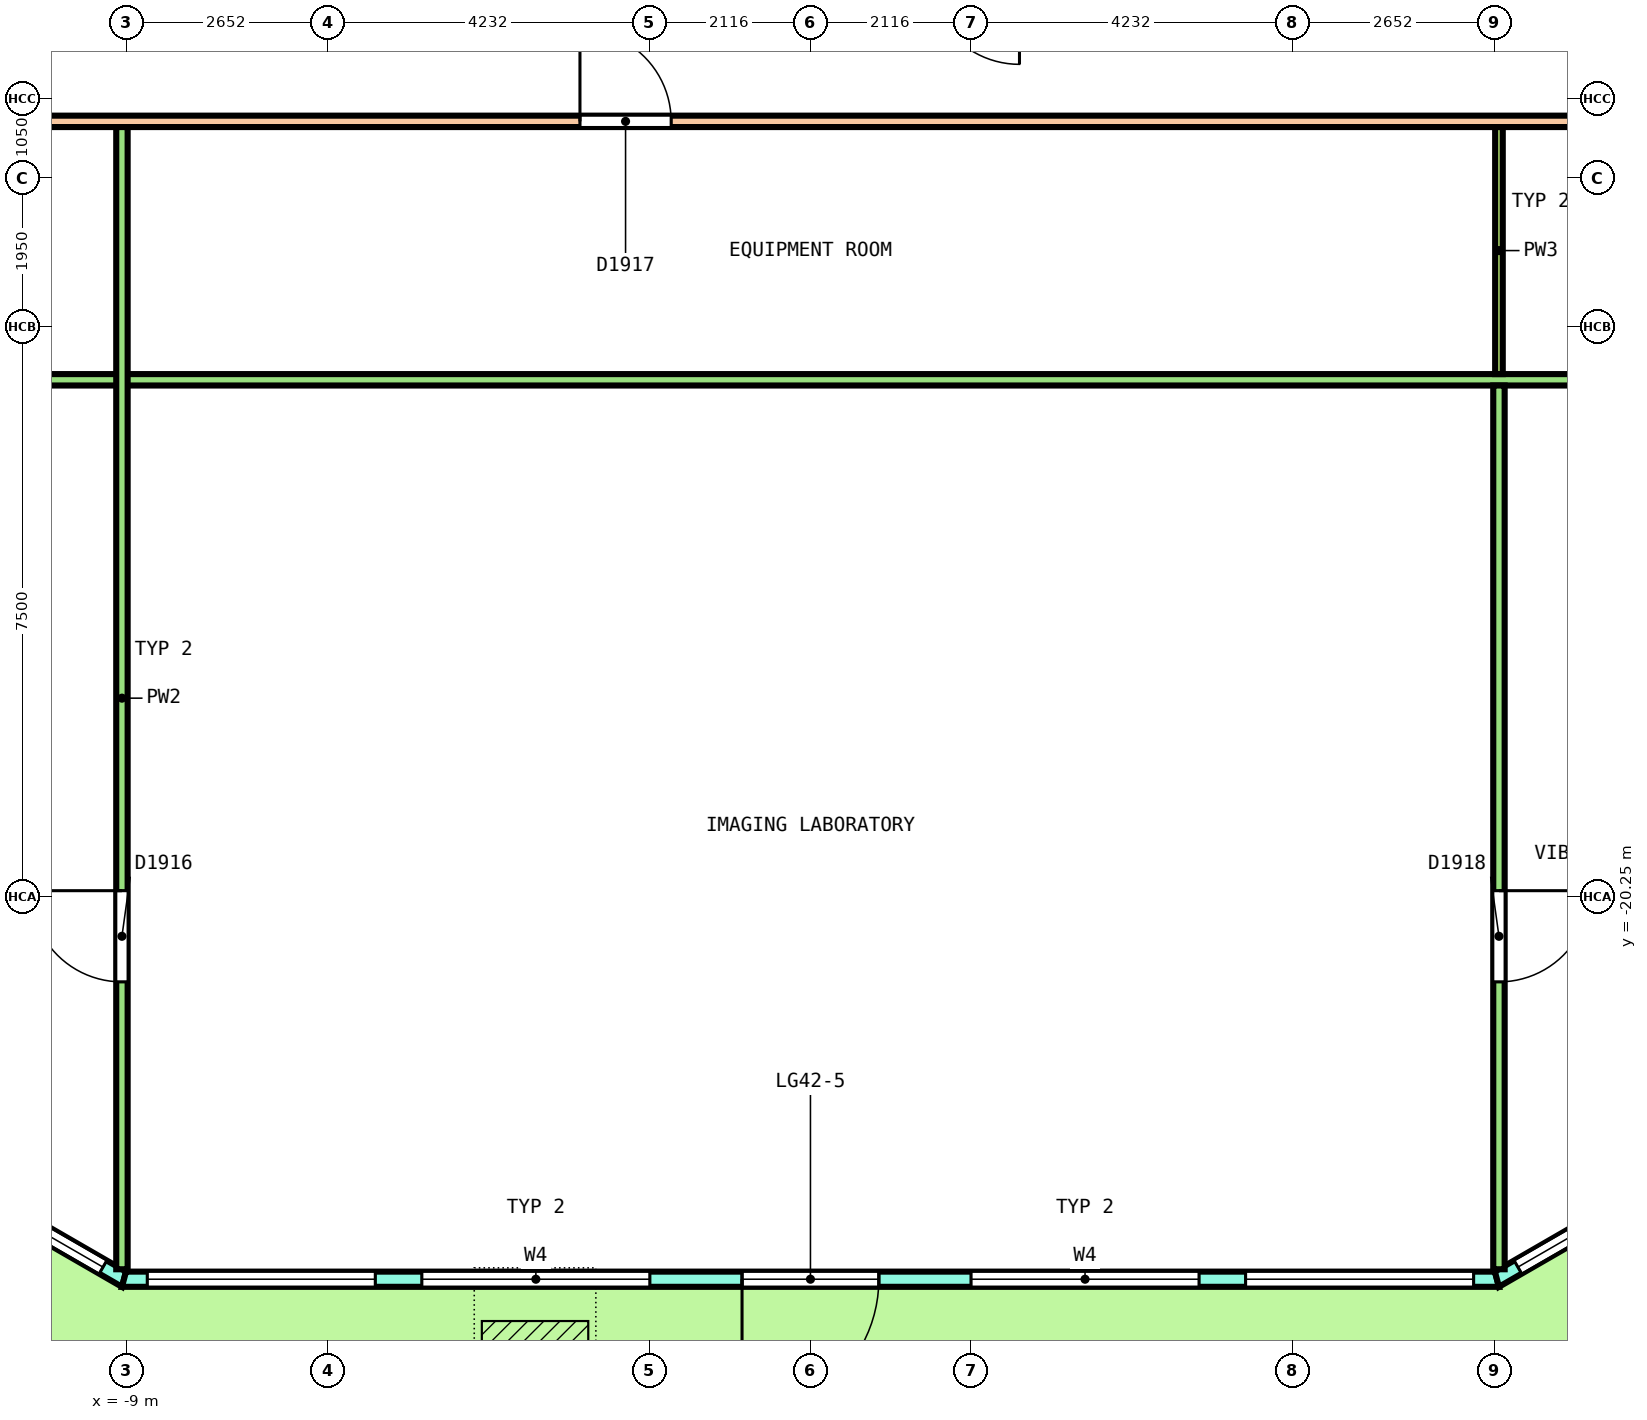
"""IFC4 building model, lengths in metres.
Left out: names, types, materials, properties, quantities, classifications, styles, units other than length and angle.
Written with IfcOpenShell. Run it as: python <this file> out.ifc"""

import sys

from ifc_helpers import new_model, si_unit, direction, frame, frame_2d, origin, place, context, subcontext, project, spatial, polyline, rectangle, outline, extrude, element, fill, save


model = new_model("IFC4")
c1 = context("Model", 3, precision=1e-05, world=origin(), true_north=direction((0.0, 1.0)))
c2 = subcontext(c1, "Body", "Model", "MODEL_VIEW")
j1 = project(units=[si_unit("LENGTHUNIT", "METRE"), si_unit("PLANEANGLEUNIT", "RADIAN")], contexts=[c1])
p1 = place(None, origin())
s1 = spatial("IfcSite", under=j1, at=p1, CompositionType="ELEMENT")
p2 = place(p1, origin())
s2 = spatial("IfcBuilding", under=s1, at=p2, CompositionType="ELEMENT")
p3 = place(p2, frame((0.0, 0.0, 193.6)))
s3 = spatial("IfcBuildingStorey", under=s2, at=p3, CompositionType="ELEMENT", Elevation=193.6)
p4 = place(p3, frame((-14.985, -21.845, 0.0), z_axis=(0.0, 0.0, 1.0), x_axis=(0.866029458321, -0.49999297727, 0.0)))
e1 = element("IfcWall", 1, at=p4, inside=s3, PredefinedType="SOLIDWALL", context=c2, shape_type="SweptSolid", body=[
    extrude(outline(polyline([(-0.027, -0.1), (1.128, -0.1), (2.282, -0.1), (3.437, -0.1), (4.592, -0.1), (5.747, -0.1), (6.901, -0.1), (6.848, 0.1), (5.711, 0.1), (4.574, 0.1), (3.437, 0.1), (2.301, 0.1), (1.164, 0.1), (0.027, 0.1), (-0.027, -0.1)])), origin(), (0.0, 0.0, 1.0), 4.1),
])
p5 = place(p4, frame((0.319, 0.0, 0.1)))
e2 = element("IfcOpeningElement", 2, at=p5, cuts=e1, PredefinedType="OPENING", context=c2, shape_type="SweptSolid", body=[
    extrude(rectangle(XDim=2.8, YDim=2.9, at=frame_2d((1.4, 1.45))), frame((0.0, 0.11, 0.0), z_axis=(0.0, -1.0, 0.0), x_axis=(1.0, 0.0, 0.0)), (0.0, 0.0, 1.0), 0.22),
])
p6 = place(p4, frame((3.756, 0.0, 0.1)))
e3 = element("IfcOpeningElement", 3, at=p6, cuts=e1, PredefinedType="OPENING", context=c2, shape_type="SweptSolid", body=[
    extrude(rectangle(XDim=2.8, YDim=2.9, at=frame_2d((1.4, 1.45))), frame((0.0, 0.11, 0.0), z_axis=(0.0, -1.0, 0.0), x_axis=(1.0, 0.0, 0.0)), (0.0, 0.0, 1.0), 0.22),
])
p7 = place(p3, frame((-9.031, -25.283, 0.0), z_axis=(0.0, 0.0, 1.0), x_axis=(1.0, 0.0, 0.0)))
e4 = element("IfcWall", 4, at=p7, inside=s3, PredefinedType="SOLIDWALL", context=c2, shape_type="SweptSolid", body=[
    extrude(outline(polyline([(-0.027, -0.1), (0.979, -0.1), (1.986, -0.1), (2.992, -0.1), (3.999, -0.1), (5.005, -0.1), (6.012, -0.1), (7.018, -0.1), (8.025, -0.1), (9.031, -0.1), (10.038, -0.1), (11.044, -0.1), (12.051, -0.1), (13.057, -0.1), (14.063, -0.1), (15.07, -0.1), (16.076, -0.1), (17.083, -0.1), (18.089, -0.1), (18.036, 0.1), (17.035, 0.1), (16.035, 0.1), (15.034, 0.1), (14.034, 0.1), (13.033, 0.1), (12.033, 0.1), (11.032, 0.1), (10.032, 0.1), (9.031, 0.1), (8.031, 0.1), (7.03, 0.1), (6.03, 0.1), (5.029, 0.1), (4.029, 0.1), (3.028, 0.1), (2.028, 0.1), (1.027, 0.1), (0.027, 0.1), (-0.027, -0.1)])), origin(), (0.0, 0.0, 1.0), 4.1),
])
p8 = place(p7, frame((0.306, 0.0, 0.1)))
e5 = element("IfcOpeningElement", 5, at=p8, cuts=e4, PredefinedType="OPENING", context=c2, shape_type="SweptSolid", body=[
    extrude(rectangle(XDim=3.0, YDim=2.9, at=frame_2d((1.5, 1.45))), frame((0.0, 0.11, 0.0), z_axis=(0.0, -1.0, 0.0), x_axis=(1.0, 0.0, 0.0)), (0.0, 0.0, 1.0), 0.22),
])
p9 = place(p7, frame((3.919, 0.0, 0.1)))
e6 = element("IfcOpeningElement", 6, at=p9, cuts=e4, PredefinedType="OPENING", context=c2, shape_type="SweptSolid", body=[
    extrude(rectangle(XDim=3.0, YDim=2.9, at=frame_2d((1.5, 1.45))), frame((0.0, 0.11, 0.0), z_axis=(0.0, -1.0, 0.0), x_axis=(1.0, 0.0, 0.0)), (0.0, 0.0, 1.0), 0.22),
])
p10 = place(p7, frame((8.131, 0.0, 0.0)))
e7 = element("IfcOpeningElement", 7, at=p10, cuts=e4, PredefinedType="OPENING", context=c2, shape_type="SweptSolid", body=[
    extrude(rectangle(XDim=1.8, YDim=2.4, at=frame_2d((0.9, 1.2))), frame((0.0, 0.11, 0.0), z_axis=(0.0, -1.0, 0.0), x_axis=(1.0, 0.0, 0.0)), (0.0, 0.0, 1.0), 0.22),
])
p11 = place(p7, frame((8.131, 0.0, 2.55)))
e8 = element("IfcOpeningElement", 8, at=p11, cuts=e4, PredefinedType="OPENING", context=c2, shape_type="SweptSolid", body=[
    extrude(rectangle(XDim=1.8, YDim=0.45, at=frame_2d((0.9, 0.225))), frame((0.0, 0.11, 0.0), z_axis=(0.0, -1.0, 0.0), x_axis=(1.0, 0.0, 0.0)), (0.0, 0.0, 1.0), 0.22),
])
p12 = place(p7, frame((11.144, 0.0, 0.1)))
e9 = element("IfcOpeningElement", 9, at=p12, cuts=e4, PredefinedType="OPENING", context=c2, shape_type="SweptSolid", body=[
    extrude(rectangle(XDim=3.0, YDim=2.9, at=frame_2d((1.5, 1.45))), frame((0.0, 0.11, 0.0), z_axis=(0.0, -1.0, 0.0), x_axis=(1.0, 0.0, 0.0)), (0.0, 0.0, 1.0), 0.22),
])
p13 = place(p7, frame((14.756, 0.0, 0.1)))
e10 = element("IfcOpeningElement", 10, at=p13, cuts=e4, PredefinedType="OPENING", context=c2, shape_type="SweptSolid", body=[
    extrude(rectangle(XDim=3.0, YDim=2.9, at=frame_2d((1.5, 1.45))), frame((0.0, 0.11, 0.0), z_axis=(0.0, -1.0, 0.0), x_axis=(1.0, 0.0, 0.0)), (0.0, 0.0, 1.0), 0.22),
])
p14 = place(p3, frame((9.031, -25.283, 0.0), z_axis=(0.0, 0.0, 1.0), x_axis=(0.866029458321, 0.49999297727, 0.0)))
e11 = element("IfcWall", 11, at=p14, inside=s3, PredefinedType="SOLIDWALL", context=c2, shape_type="SweptSolid", body=[
    extrude(outline(polyline([(-0.027, -0.1), (1.128, -0.1), (2.282, -0.1), (3.437, -0.1), (4.592, -0.1), (5.747, -0.1), (6.901, -0.1), (6.848, 0.1), (5.711, 0.1), (4.574, 0.1), (3.437, 0.1), (2.301, 0.1), (1.164, 0.1), (0.027, 0.1), (-0.027, -0.1)])), origin(), (0.0, 0.0, 1.0), 4.1),
])
p15 = place(p14, frame((0.319, 0.0, 0.1)))
e12 = element("IfcOpeningElement", 12, at=p15, cuts=e11, PredefinedType="OPENING", context=c2, shape_type="SweptSolid", body=[
    extrude(rectangle(XDim=2.8, YDim=2.9, at=frame_2d((1.4, 1.45))), frame((0.0, 0.11, 0.0), z_axis=(0.0, -1.0, 0.0), x_axis=(1.0, 0.0, 0.0)), (0.0, 0.0, 1.0), 0.22),
])
p16 = place(p14, frame((3.756, 0.0, 0.1)))
e13 = element("IfcOpeningElement", 13, at=p16, cuts=e11, PredefinedType="OPENING", context=c2, shape_type="SweptSolid", body=[
    extrude(rectangle(XDim=2.8, YDim=2.9, at=frame_2d((1.4, 1.45))), frame((0.0, 0.11, 0.0), z_axis=(0.0, -1.0, 0.0), x_axis=(1.0, 0.0, 0.0)), (0.0, 0.0, 1.0), 0.22),
])
p17 = place(p3, frame((-15.225, -10.05, 0.0), z_axis=(0.0, 0.0, 1.0), x_axis=(1.0, 0.0, 0.0)))
e14 = element("IfcWall", 14, at=p17, inside=s3, PredefinedType="PARTITIONING", context=c2, shape_type="SweptSolid", body=[
    extrude(rectangle(XDim=30.325, YDim=0.15, at=frame_2d((15.163, 0.0))), origin(), (0.0, 0.0, 1.0), 3.05),
])
p18 = place(p17, frame((3.742, 0.0, 0.0)))
e15 = element("IfcOpeningElement", 15, at=p18, cuts=e14, PredefinedType="OPENING", context=c2, shape_type="SweptSolid", body=[
    extrude(rectangle(XDim=1.0, YDim=2.1, at=frame_2d((0.5, 1.05))), frame((0.0, 0.085, 0.0), z_axis=(0.0, -1.0, 0.0), x_axis=(1.0, 0.0, 0.0)), (0.0, 0.0, 1.0), 0.17),
])
p19 = place(p17, frame((12.193, 0.0, 0.0)))
e16 = element("IfcOpeningElement", 16, at=p19, cuts=e14, PredefinedType="OPENING", context=c2, shape_type="SweptSolid", body=[
    extrude(rectangle(XDim=1.2, YDim=2.1, at=frame_2d((0.6, 1.05))), frame((0.0, 0.085, 0.0), z_axis=(0.0, -1.0, 0.0), x_axis=(1.0, 0.0, 0.0)), (0.0, 0.0, 1.0), 0.17),
])
p20 = place(p17, frame((26.829, 0.0, 0.0)))
e17 = element("IfcOpeningElement", 17, at=p20, cuts=e14, PredefinedType="OPENING", context=c2, shape_type="SweptSolid", body=[
    extrude(rectangle(XDim=1.0, YDim=2.1, at=frame_2d((0.5, 1.05))), frame((0.0, 0.085, 0.0), z_axis=(0.0, -1.0, 0.0), x_axis=(1.0, 0.0, 0.0)), (0.0, 0.0, 1.0), 0.17),
])
p21 = place(p3, frame((-14.983, -13.45, 0.0), z_axis=(0.0, 0.0, 1.0), x_axis=(1.0, 0.0, 0.0)))
e18 = element("IfcWall", 18, at=p21, inside=s3, PredefinedType="PARTITIONING", context=c2, shape_type="SweptSolid", body=[
    extrude(rectangle(XDim=31.004, YDim=0.15, at=frame_2d((15.502, 0.0))), origin(), (0.0, 0.0, 1.0), 3.05),
])
p22 = place(p21, frame((1.3, 0.0, 0.0)))
e19 = element("IfcOpeningElement", 19, at=p22, cuts=e18, PredefinedType="OPENING", context=c2, shape_type="SweptSolid", body=[
    extrude(rectangle(XDim=1.2, YDim=2.1, at=frame_2d((0.6, 1.05))), frame((0.0, 0.085, 0.0), z_axis=(0.0, -1.0, 0.0), x_axis=(1.0, 0.0, 0.0)), (0.0, 0.0, 1.0), 0.17),
])
p23 = place(p3, frame((-9.058, -25.152, 0.0), z_axis=(0.0, 0.0, 1.0), x_axis=(0.0, 1.0, 0.0)))
e20 = element("IfcWall", 20, at=p23, inside=s3, PredefinedType="PARTITIONING", context=c2, shape_type="SweptSolid", body=[
    extrude(rectangle(XDim=15.027, YDim=0.15, at=frame_2d((7.513, 0.0))), origin(), (0.0, 0.0, 1.0), 3.05),
])
p24 = place(p23, frame((3.781, 0.0, 0.0)))
e21 = element("IfcOpeningElement", 21, at=p24, cuts=e20, PredefinedType="OPENING", context=c2, shape_type="SweptSolid", body=[
    extrude(rectangle(XDim=1.2, YDim=2.1, at=frame_2d((0.6, 1.05))), frame((0.0, 0.085, 0.0), z_axis=(0.0, -1.0, 0.0), x_axis=(1.0, 0.0, 0.0)), (0.0, 0.0, 1.0), 0.17),
])
p25 = place(p3, frame((9.058, -25.152, 0.0), z_axis=(0.0, 0.0, 1.0), x_axis=(0.0, 1.0, 0.0)))
e22 = element("IfcWall", 22, at=p25, inside=s3, PredefinedType="PARTITIONING", context=c2, shape_type="SweptSolid", body=[
    extrude(rectangle(XDim=11.627, YDim=0.15, at=frame_2d((5.813, 0.0))), origin(), (0.0, 0.0, 1.0), 3.05),
])
p26 = place(p25, frame((3.781, 0.0, 0.0)))
e23 = element("IfcOpeningElement", 23, at=p26, cuts=e22, PredefinedType="OPENING", context=c2, shape_type="SweptSolid", body=[
    extrude(rectangle(XDim=1.2, YDim=2.1, at=frame_2d((0.6, 1.05))), frame((0.0, 0.085, 0.0), z_axis=(0.0, -1.0, 0.0), x_axis=(1.0, 0.0, 0.0)), (0.0, 0.0, 1.0), 0.17),
])
p27 = place(p3, frame((9.058, -13.375, 0.0), z_axis=(0.0, 0.0, 1.0), x_axis=(0.0, 1.0, 0.0)))
e24 = element("IfcWall", 24, at=p27, inside=s3, PredefinedType="PARTITIONING", context=c2, shape_type="SweptSolid", body=[
    extrude(rectangle(XDim=3.25, YDim=0.1, at=frame_2d((1.625, 0.0))), origin(), (0.0, 0.0, 1.0), 3.05),
])
p28 = place(p6, origin())
e25 = element("IfcWindow", 25, at=p28, inside=s3, PartitioningType="SINGLE_PANEL", PredefinedType="WINDOW", context=c2, shape_type="SweptSolid", body=[
    extrude(rectangle(XDim=2.8, YDim=2.9, at=frame_2d((1.4, 1.45))), frame((0.0, 0.03, 0.0), z_axis=(0.0, -1.0, 0.0), x_axis=(1.0, 0.0, 0.0)), (0.0, 0.0, 1.0), 0.06),
])
fill(e3, e25)
p29 = place(p8, origin())
e26 = element("IfcWindow", 26, at=p29, inside=s3, PartitioningType="SINGLE_PANEL", PredefinedType="WINDOW", context=c2, shape_type="SweptSolid", body=[
    extrude(rectangle(XDim=3.0, YDim=2.9, at=frame_2d((1.5, 1.45))), frame((0.0, 0.03, 0.0), z_axis=(0.0, -1.0, 0.0), x_axis=(1.0, 0.0, 0.0)), (0.0, 0.0, 1.0), 0.06),
])
fill(e5, e26)
p30 = place(p9, origin())
e27 = element("IfcWindow", 27, at=p30, inside=s3, PartitioningType="SINGLE_PANEL", PredefinedType="WINDOW", context=c2, shape_type="SweptSolid", body=[
    extrude(rectangle(XDim=3.0, YDim=2.9, at=frame_2d((1.5, 1.45))), frame((0.0, 0.03, 0.0), z_axis=(0.0, -1.0, 0.0), x_axis=(1.0, 0.0, 0.0)), (0.0, 0.0, 1.0), 0.06),
])
fill(e6, e27)
p31 = place(p10, origin())
e28 = element("IfcDoor", 28, at=p31, inside=s3, OperationType="DOUBLE_DOOR_SINGLE_SWING", PredefinedType="DOOR", context=c2, shape_type="SweptSolid", body=[
    extrude(rectangle(XDim=1.8, YDim=2.4, at=frame_2d((0.9, 1.2))), frame((0.0, 0.025, 0.0), z_axis=(0.0, -1.0, 0.0), x_axis=(1.0, 0.0, 0.0)), (0.0, 0.0, 1.0), 0.05),
])
fill(e7, e28)
p32 = place(p11, origin())
e29 = element("IfcWindow", 29, at=p32, inside=s3, PartitioningType="SINGLE_PANEL", PredefinedType="WINDOW", context=c2, shape_type="SweptSolid", body=[
    extrude(rectangle(XDim=1.8, YDim=0.45, at=frame_2d((0.9, 0.225))), frame((0.0, 0.03, 0.0), z_axis=(0.0, -1.0, 0.0), x_axis=(1.0, 0.0, 0.0)), (0.0, 0.0, 1.0), 0.06),
])
fill(e8, e29)
p33 = place(p12, origin())
e30 = element("IfcWindow", 30, at=p33, inside=s3, PartitioningType="SINGLE_PANEL", PredefinedType="WINDOW", context=c2, shape_type="SweptSolid", body=[
    extrude(rectangle(XDim=3.0, YDim=2.9, at=frame_2d((1.5, 1.45))), frame((0.0, 0.03, 0.0), z_axis=(0.0, -1.0, 0.0), x_axis=(1.0, 0.0, 0.0)), (0.0, 0.0, 1.0), 0.06),
])
fill(e9, e30)
p34 = place(p13, origin())
e31 = element("IfcWindow", 31, at=p34, inside=s3, PartitioningType="SINGLE_PANEL", PredefinedType="WINDOW", context=c2, shape_type="SweptSolid", body=[
    extrude(rectangle(XDim=3.0, YDim=2.9, at=frame_2d((1.5, 1.45))), frame((0.0, 0.03, 0.0), z_axis=(0.0, -1.0, 0.0), x_axis=(1.0, 0.0, 0.0)), (0.0, 0.0, 1.0), 0.06),
])
fill(e10, e31)
p35 = place(p15, origin())
e32 = element("IfcWindow", 32, at=p35, inside=s3, PartitioningType="SINGLE_PANEL", PredefinedType="WINDOW", context=c2, shape_type="SweptSolid", body=[
    extrude(rectangle(XDim=2.8, YDim=2.9, at=frame_2d((1.4, 1.45))), frame((0.0, 0.03, 0.0), z_axis=(0.0, -1.0, 0.0), x_axis=(1.0, 0.0, 0.0)), (0.0, 0.0, 1.0), 0.06),
])
fill(e12, e32)
p36 = place(p24, origin())
e33 = element("IfcDoor", 33, at=p36, inside=s3, OperationType="DOUBLE_DOOR_SINGLE_SWING", PredefinedType="DOOR", context=c2, shape_type="SweptSolid", body=[
    extrude(rectangle(XDim=1.2, YDim=2.1, at=frame_2d((0.6, 1.05))), frame((0.0, 0.025, 0.0), z_axis=(0.0, -1.0, 0.0), x_axis=(1.0, 0.0, 0.0)), (0.0, 0.0, 1.0), 0.05),
])
fill(e21, e33)
p37 = place(p19, origin())
e34 = element("IfcDoor", 34, at=p37, inside=s3, OperationType="DOUBLE_DOOR_SINGLE_SWING", PredefinedType="DOOR", context=c2, shape_type="SweptSolid", body=[
    extrude(rectangle(XDim=1.2, YDim=2.1, at=frame_2d((0.6, 1.05))), frame((0.0, 0.025, 0.0), z_axis=(0.0, -1.0, 0.0), x_axis=(1.0, 0.0, 0.0)), (0.0, 0.0, 1.0), 0.05),
])
fill(e16, e34)
p38 = place(p26, origin())
e35 = element("IfcDoor", 35, at=p38, inside=s3, OperationType="DOUBLE_DOOR_SINGLE_SWING", PredefinedType="DOOR", context=c2, shape_type="SweptSolid", body=[
    extrude(rectangle(XDim=1.2, YDim=2.1, at=frame_2d((0.6, 1.05))), frame((0.0, 0.025, 0.0), z_axis=(0.0, -1.0, 0.0), x_axis=(1.0, 0.0, 0.0)), (0.0, 0.0, 1.0), 0.05),
])
fill(e23, e35)
save(model, sys.argv[1])
